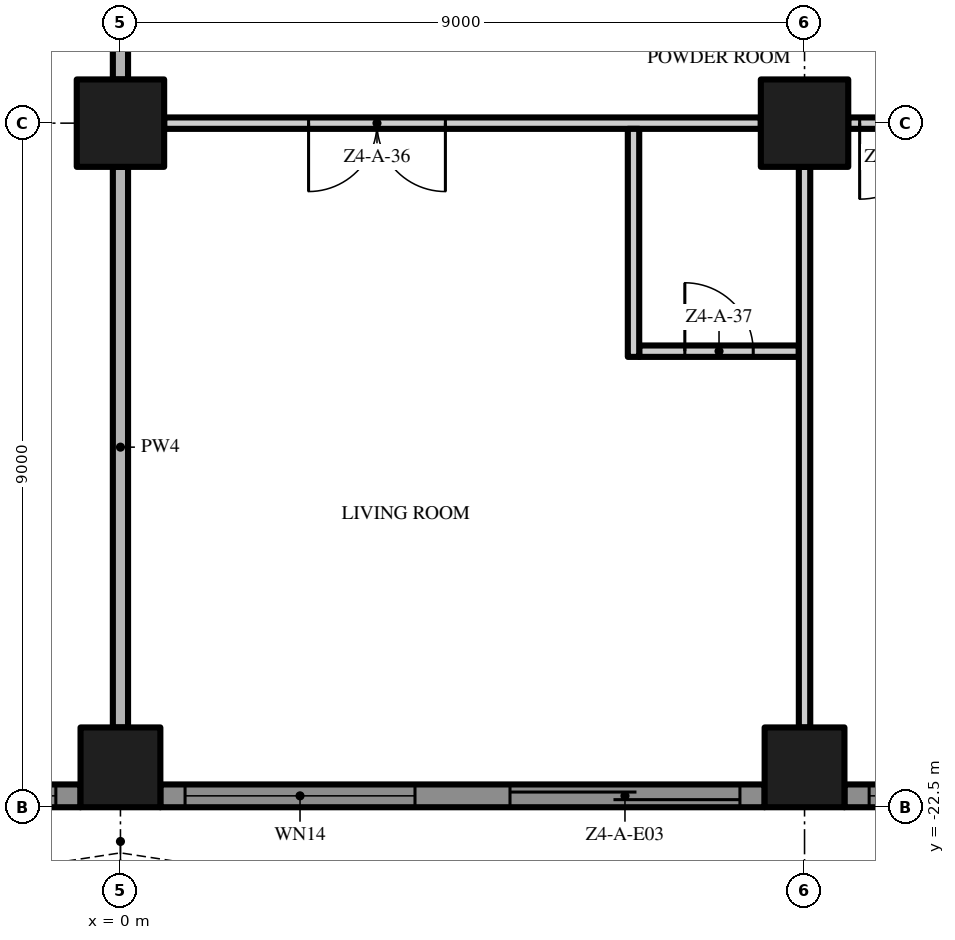
"""IFC4 building model, lengths in metres.
Left out: names, types, materials, properties, quantities, classifications, styles, units other than length and angle.
Written with IfcOpenShell. Run it as: python <this file> out.ifc"""

import sys

from ifc_helpers import new_model, si_unit, direction, frame, frame_2d, origin, origin_2d, place, context, subcontext, project, spatial, polyline, rectangle, outline, extrude, element, fill, save


model = new_model("IFC4")
c1 = context("Model", 3, precision=1e-05, world=origin(), true_north=direction((0.0, 1.0)))
c2 = subcontext(c1, "Body", "Model", "MODEL_VIEW")
j1 = project(units=[si_unit("LENGTHUNIT", "METRE"), si_unit("PLANEANGLEUNIT", "RADIAN")], contexts=[c1])
p1 = place(None, origin())
s1 = spatial("IfcSite", under=j1, at=p1, CompositionType="ELEMENT")
p2 = place(p1, origin())
s2 = spatial("IfcBuilding", under=s1, at=p2, CompositionType="ELEMENT")
p3 = place(p2, frame((0.0, 0.0, 188.2)))
s3 = spatial("IfcBuildingStorey", under=s2, at=p3, CompositionType="ELEMENT", Elevation=188.2)
p4 = place(p3, frame((0.0, -13.5, 0.0), z_axis=(0.0, 0.0, 1.0), x_axis=(1.0, 0.0, 0.0)))
e1 = element("IfcColumn", 1, at=p4, inside=s3, PredefinedType="COLUMN", context=c2, shape_type="SweptSolid", body=[
    extrude(rectangle(XDim=1.15, YDim=1.15, at=origin_2d()), origin(), (0.0, 0.0, 1.0), 3.5),
])
p5 = place(p3, frame((0.0, -21.975, 0.0), z_axis=(0.0, 0.0, 1.0), x_axis=(1.0, 0.0, 0.0)))
e2 = element("IfcColumn", 2, at=p5, inside=s3, PredefinedType="COLUMN", context=c2, shape_type="SweptSolid", body=[
    extrude(rectangle(XDim=1.05, YDim=1.05, at=origin_2d()), origin(), (0.0, 0.0, 1.0), 3.5),
])
p6 = place(p3, frame((9.0, -13.5, 0.0), z_axis=(0.0, 0.0, 1.0), x_axis=(1.0, 0.0, 0.0)))
e3 = element("IfcColumn", 3, at=p6, inside=s3, PredefinedType="COLUMN", context=c2, shape_type="SweptSolid", body=[
    extrude(rectangle(XDim=1.15, YDim=1.15, at=origin_2d()), origin(), (0.0, 0.0, 1.0), 3.5),
])
p7 = place(p3, frame((9.0, -21.975, 0.0), z_axis=(0.0, 0.0, 1.0), x_axis=(1.0, 0.0, 0.0)))
e4 = element("IfcColumn", 4, at=p7, inside=s3, PredefinedType="COLUMN", context=c2, shape_type="SweptSolid", body=[
    extrude(rectangle(XDim=1.05, YDim=1.05, at=origin_2d()), origin(), (0.0, 0.0, 1.0), 3.5),
])
p8 = place(p3, frame((-0.525, -22.35, 0.0), z_axis=(0.0, 0.0, 1.0), x_axis=(-1.0, 0.0, 0.0)))
e5 = element("IfcWall", 5, at=p8, inside=s3, PredefinedType="SOLIDWALL", context=c2, shape_type="SweptSolid", body=[
    extrude(rectangle(XDim=7.95, YDim=0.3, at=frame_2d((3.975, 0.0))), origin(), (0.0, 0.0, 1.0), 3.5),
])
p9 = place(p8, frame((4.6, 0.0, 0.0)))
e6 = element("IfcOpeningElement", 6, at=p9, cuts=e5, PredefinedType="OPENING", context=c2, shape_type="SweptSolid", body=[
    extrude(rectangle(XDim=3.025, YDim=2.4, at=frame_2d((1.512, 1.2))), frame((0.0, 0.16, 0.0), z_axis=(0.0, -1.0, 0.0), x_axis=(1.0, 0.0, 0.0)), (0.0, 0.0, 1.0), 0.32),
])
p10 = place(p8, frame((0.325, 0.0, 0.45)))
e7 = element("IfcOpeningElement", 7, at=p10, cuts=e5, PredefinedType="OPENING", context=c2, shape_type="SweptSolid", body=[
    extrude(rectangle(XDim=3.025, YDim=2.65, at=frame_2d((1.512, 1.325))), frame((0.0, 0.16, 0.0), z_axis=(0.0, -1.0, 0.0), x_axis=(1.0, 0.0, 0.0)), (0.0, 0.0, 1.0), 0.32),
])
p11 = place(p3, frame((8.475, -22.35, 0.0), z_axis=(0.0, 0.0, 1.0), x_axis=(-1.0, 0.0, 0.0)))
e8 = element("IfcWall", 8, at=p11, inside=s3, PredefinedType="SOLIDWALL", context=c2, shape_type="SweptSolid", body=[
    extrude(rectangle(XDim=7.95, YDim=0.3, at=frame_2d((3.975, 0.0))), origin(), (0.0, 0.0, 1.0), 3.5),
])
p12 = place(p11, frame((4.6, 0.0, 0.45)))
e9 = element("IfcOpeningElement", 9, at=p12, cuts=e8, PredefinedType="OPENING", context=c2, shape_type="SweptSolid", body=[
    extrude(rectangle(XDim=3.025, YDim=2.65, at=frame_2d((1.512, 1.325))), frame((0.0, 0.16, 0.0), z_axis=(0.0, -1.0, 0.0), x_axis=(1.0, 0.0, 0.0)), (0.0, 0.0, 1.0), 0.32),
])
p13 = place(p11, frame((0.325, 0.0, 0.0)))
e10 = element("IfcOpeningElement", 10, at=p13, cuts=e8, PredefinedType="OPENING", context=c2, shape_type="SweptSolid", body=[
    extrude(rectangle(XDim=3.025, YDim=2.4, at=frame_2d((1.512, 1.2))), frame((0.0, 0.16, 0.0), z_axis=(0.0, -1.0, 0.0), x_axis=(1.0, 0.0, 0.0)), (0.0, 0.0, 1.0), 0.32),
])
p14 = place(p3, frame((17.475, -22.35, 0.0), z_axis=(0.0, 0.0, 1.0), x_axis=(-1.0, 0.0, 0.0)))
e11 = element("IfcWall", 11, at=p14, inside=s3, PredefinedType="SOLIDWALL", context=c2, shape_type="SweptSolid", body=[
    extrude(rectangle(XDim=7.95, YDim=0.3, at=frame_2d((3.975, 0.0))), origin(), (0.0, 0.0, 1.0), 3.5),
])
p15 = place(p14, frame((4.6, 0.0, 0.45)))
e12 = element("IfcOpeningElement", 12, at=p15, cuts=e11, PredefinedType="OPENING", context=c2, shape_type="SweptSolid", body=[
    extrude(rectangle(XDim=3.025, YDim=2.65, at=frame_2d((1.512, 1.325))), frame((0.0, 0.16, 0.0), z_axis=(0.0, -1.0, 0.0), x_axis=(1.0, 0.0, 0.0)), (0.0, 0.0, 1.0), 0.32),
])
p16 = place(p14, frame((0.325, 0.0, 0.45)))
e13 = element("IfcOpeningElement", 13, at=p16, cuts=e11, PredefinedType="OPENING", context=c2, shape_type="SweptSolid", body=[
    extrude(rectangle(XDim=3.025, YDim=2.65, at=frame_2d((1.512, 1.325))), frame((0.0, 0.16, 0.0), z_axis=(0.0, -1.0, 0.0), x_axis=(1.0, 0.0, 0.0)), (0.0, 0.0, 1.0), 0.32),
])
p17 = place(p3, origin())
e14 = element("IfcWall", 14, at=p17, inside=s3, PredefinedType="USERDEFINED", context=c2, shape_type="SweptSolid", body=[
    extrude(outline(polyline([(-22.5, -25.5), (-21.0, -25.271), (-19.5, -24.671), (-18.0, -23.929), (-16.5, -23.329), (-15.0, -23.1), (-13.5, -23.329), (-12.0, -23.929), (-10.5, -24.671), (-9.0, -25.271), (-7.5, -25.5), (-6.0, -25.271), (-4.5, -24.671), (-3.0, -23.929), (-1.5, -23.329), (0.0, -23.1), (1.5, -23.329), (3.0, -23.929), (4.5, -24.671), (6.0, -25.271), (7.5, -25.5), (9.0, -25.271), (10.5, -24.671), (12.0, -23.929), (13.5, -23.329), (15.0, -23.1), (16.5, -23.329), (18.0, -23.929), (19.5, -24.671), (21.0, -25.271), (22.5, -25.5), (22.538, -25.253), (21.066, -25.028), (19.602, -24.442), (18.102, -23.701), (16.566, -23.086), (15.0, -22.847), (13.434, -23.086), (11.898, -23.701), (10.398, -24.442), (8.934, -25.028), (7.5, -25.247), (6.066, -25.028), (4.602, -24.442), (3.102, -23.701), (1.566, -23.086), (0.0, -22.847), (-1.566, -23.086), (-3.102, -23.701), (-4.602, -24.442), (-6.066, -25.028), (-7.5, -25.247), (-8.934, -25.028), (-10.398, -24.442), (-11.898, -23.701), (-13.434, -23.086), (-15.0, -22.847), (-16.566, -23.086), (-18.102, -23.701), (-19.602, -24.442), (-21.066, -25.028), (-22.538, -25.253), (-22.5, -25.5)])), origin(), (0.0, 0.0, 1.0), 0.9),
])
p18 = place(p3, frame((6.825, -16.5, 0.0), z_axis=(0.0, 0.0, 1.0), x_axis=(1.0, 0.0, 0.0)))
e15 = element("IfcWall", 15, at=p18, inside=s3, PredefinedType="PARTITIONING", context=c2, shape_type="SweptSolid", body=[
    extrude(rectangle(XDim=2.1, YDim=0.15, at=frame_2d((1.05, 0.0))), origin(), (0.0, 0.0, 1.0), 3.5),
])
p19 = place(p18, frame((0.6, 0.0, 0.0)))
e16 = element("IfcOpeningElement", 16, at=p19, cuts=e15, PredefinedType="OPENING", context=c2, shape_type="SweptSolid", body=[
    extrude(rectangle(XDim=0.9, YDim=2.1, at=frame_2d((0.45, 1.05))), frame((0.0, 0.085, 0.0), z_axis=(0.0, -1.0, 0.0), x_axis=(1.0, 0.0, 0.0)), (0.0, 0.0, 1.0), 0.17),
])
p20 = place(p3, frame((8.425, -13.5, 0.0), z_axis=(0.0, 0.0, 1.0), x_axis=(-1.0, 0.0, 0.0)))
e17 = element("IfcWall", 17, at=p20, inside=s3, PredefinedType="PARTITIONING", context=c2, shape_type="SweptSolid", body=[
    extrude(rectangle(XDim=7.85, YDim=0.15, at=frame_2d((3.925, 0.0))), origin(), (0.0, 0.0, 1.0), 3.5),
])
p21 = place(p20, frame((4.15, 0.0, 0.0)))
e18 = element("IfcOpeningElement", 18, at=p21, cuts=e17, PredefinedType="OPENING", context=c2, shape_type="SweptSolid", body=[
    extrude(rectangle(XDim=1.8, YDim=2.4, at=frame_2d((0.9, 1.2))), frame((0.0, 0.085, 0.0), z_axis=(0.0, -1.0, 0.0), x_axis=(1.0, 0.0, 0.0)), (0.0, 0.0, 1.0), 0.17),
])
p22 = place(p3, frame((17.425, -13.5, 0.0), z_axis=(0.0, 0.0, 1.0), x_axis=(-1.0, 0.0, 0.0)))
e19 = element("IfcWall", 19, at=p22, inside=s3, PredefinedType="PARTITIONING", context=c2, shape_type="SweptSolid", body=[
    extrude(rectangle(XDim=7.85, YDim=0.15, at=frame_2d((3.925, 0.0))), origin(), (0.0, 0.0, 1.0), 3.5),
])
p23 = place(p22, frame((6.7, 0.0, 0.0)))
e20 = element("IfcOpeningElement", 20, at=p23, cuts=e19, PredefinedType="OPENING", context=c2, shape_type="SweptSolid", body=[
    extrude(rectangle(XDim=1.0, YDim=2.4, at=frame_2d((0.5, 1.2))), frame((0.0, 0.085, 0.0), z_axis=(0.0, -1.0, 0.0), x_axis=(1.0, 0.0, 0.0)), (0.0, 0.0, 1.0), 0.17),
])
p24 = place(p22, frame((0.15, 0.0, 0.0)))
e21 = element("IfcOpeningElement", 21, at=p24, cuts=e19, PredefinedType="OPENING", context=c2, shape_type="SweptSolid", body=[
    extrude(rectangle(XDim=1.0, YDim=2.4, at=frame_2d((0.5, 1.2))), frame((0.0, 0.085, 0.0), z_axis=(0.0, -1.0, 0.0), x_axis=(1.0, 0.0, 0.0)), (0.0, 0.0, 1.0), 0.17),
])
p25 = place(p3, frame((0.0, -21.45, 0.0), z_axis=(0.0, 0.0, 1.0), x_axis=(0.0, 1.0, 0.0)))
e22 = element("IfcWall", 22, at=p25, inside=s3, PredefinedType="PARTITIONING", context=c2, shape_type="SweptSolid", body=[
    extrude(rectangle(XDim=7.375, YDim=0.2, at=frame_2d((3.688, 0.0))), origin(), (0.0, 0.0, 1.0), 3.5),
])
p26 = place(p3, frame((0.0, -12.925, 0.0), z_axis=(0.0, 0.0, 1.0), x_axis=(0.0, 1.0, 0.0)))
e23 = element("IfcWall", 23, at=p26, inside=s3, PredefinedType="PARTITIONING", context=c2, shape_type="SweptSolid", body=[
    extrude(rectangle(XDim=7.85, YDim=0.2, at=frame_2d((3.925, 0.0))), origin(), (0.0, 0.0, 1.0), 3.5),
])
p27 = place(p3, frame((6.75, -16.575, 0.0), z_axis=(0.0, 0.0, 1.0), x_axis=(0.0, 1.0, 0.0)))
e24 = element("IfcWall", 24, at=p27, inside=s3, PredefinedType="PARTITIONING", context=c2, shape_type="SweptSolid", body=[
    extrude(rectangle(XDim=3.0, YDim=0.15, at=frame_2d((1.5, 0.0))), origin(), (0.0, 0.0, 1.0), 3.5),
])
p28 = place(p3, frame((9.0, -21.45, 0.0), z_axis=(0.0, 0.0, 1.0), x_axis=(0.0, 1.0, 0.0)))
e25 = element("IfcWall", 25, at=p28, inside=s3, PredefinedType="PARTITIONING", context=c2, shape_type="SweptSolid", body=[
    extrude(rectangle(XDim=7.375, YDim=0.15, at=frame_2d((3.688, 0.0))), origin(), (0.0, 0.0, 1.0), 3.5),
])
p29 = place(p10, origin())
e26 = element("IfcWindow", 26, at=p29, inside=s3, PartitioningType="SINGLE_PANEL", PredefinedType="WINDOW", context=c2, shape_type="SweptSolid", body=[
    extrude(rectangle(XDim=3.025, YDim=2.65, at=frame_2d((1.512, 1.325))), frame((0.0, 0.03, 0.0), z_axis=(0.0, -1.0, 0.0), x_axis=(1.0, 0.0, 0.0)), (0.0, 0.0, 1.0), 0.06),
])
fill(e7, e26)
p30 = place(p12, origin())
e27 = element("IfcWindow", 27, at=p30, inside=s3, PartitioningType="SINGLE_PANEL", PredefinedType="WINDOW", context=c2, shape_type="SweptSolid", body=[
    extrude(rectangle(XDim=3.025, YDim=2.65, at=frame_2d((1.512, 1.325))), frame((0.0, 0.03, 0.0), z_axis=(0.0, -1.0, 0.0), x_axis=(1.0, 0.0, 0.0)), (0.0, 0.0, 1.0), 0.06),
])
fill(e9, e27)
p31 = place(p13, origin())
e28 = element("IfcDoor", 28, at=p31, inside=s3, OperationType="SINGLE_SWING_LEFT", PredefinedType="DOOR", context=c2, shape_type="SweptSolid", body=[
    extrude(rectangle(XDim=3.025, YDim=2.4, at=frame_2d((1.512, 1.2))), frame((0.0, 0.025, 0.0), z_axis=(0.0, -1.0, 0.0), x_axis=(1.0, 0.0, 0.0)), (0.0, 0.0, 1.0), 0.05),
])
fill(e10, e28)
p32 = place(p15, origin())
e29 = element("IfcWindow", 29, at=p32, inside=s3, PartitioningType="SINGLE_PANEL", PredefinedType="WINDOW", context=c2, shape_type="SweptSolid", body=[
    extrude(rectangle(XDim=3.025, YDim=2.65, at=frame_2d((1.512, 1.325))), frame((0.0, 0.03, 0.0), z_axis=(0.0, -1.0, 0.0), x_axis=(1.0, 0.0, 0.0)), (0.0, 0.0, 1.0), 0.06),
])
fill(e12, e29)
p33 = place(p21, origin())
e30 = element("IfcDoor", 30, at=p33, inside=s3, OperationType="DOUBLE_DOOR_SINGLE_SWING", PredefinedType="DOOR", context=c2, shape_type="SweptSolid", body=[
    extrude(rectangle(XDim=1.8, YDim=2.4, at=frame_2d((0.9, 1.2))), frame((0.0, 0.025, 0.0), z_axis=(0.0, -1.0, 0.0), x_axis=(1.0, 0.0, 0.0)), (0.0, 0.0, 1.0), 0.05),
])
fill(e18, e30)
p34 = place(p19, origin())
e31 = element("IfcDoor", 31, at=p34, inside=s3, OperationType="SINGLE_SWING_LEFT", PredefinedType="DOOR", context=c2, shape_type="SweptSolid", body=[
    extrude(rectangle(XDim=0.9, YDim=2.1, at=frame_2d((0.45, 1.05))), frame((0.0, 0.025, 0.0), z_axis=(0.0, -1.0, 0.0), x_axis=(1.0, 0.0, 0.0)), (0.0, 0.0, 1.0), 0.05),
])
fill(e16, e31)
p35 = place(p23, origin())
e32 = element("IfcDoor", 32, at=p35, inside=s3, OperationType="SINGLE_SWING_RIGHT", PredefinedType="DOOR", context=c2, shape_type="SweptSolid", body=[
    extrude(rectangle(XDim=1.0, YDim=2.4, at=frame_2d((0.5, 1.2))), frame((0.0, 0.025, 0.0), z_axis=(0.0, -1.0, 0.0), x_axis=(1.0, 0.0, 0.0)), (0.0, 0.0, 1.0), 0.05),
])
fill(e20, e32)
save(model, sys.argv[1])
